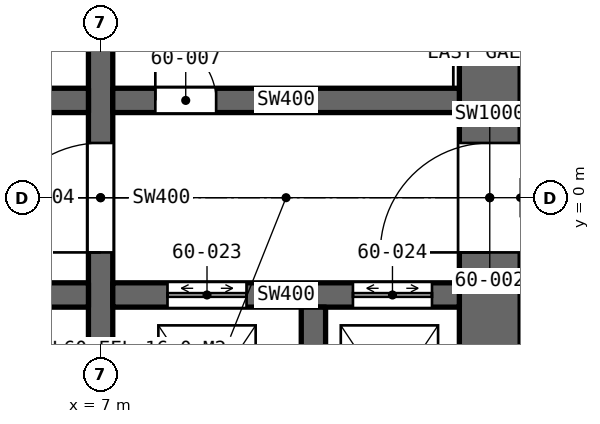
"""IFC4 building model, lengths in metres.
Left out: names, types, materials, properties, quantities, classifications, styles, units other than length and angle.
Written with IfcOpenShell. Run it as: python <this file> out.ifc"""

import sys

from ifc_helpers import new_model, si_unit, direction, frame, frame_2d, origin, place, context, subcontext, project, spatial, rectangle, extrude, element, fill, save


model = new_model("IFC4")
c1 = context("Model", 3, precision=1e-05, world=origin(), true_north=direction((0.0, 1.0)))
c2 = subcontext(c1, "Body", "Model", "MODEL_VIEW")
j1 = project(units=[si_unit("LENGTHUNIT", "METRE"), si_unit("PLANEANGLEUNIT", "RADIAN")], contexts=[c1])
p1 = place(None, origin())
s1 = spatial("IfcSite", under=j1, at=p1, CompositionType="ELEMENT")
p2 = place(p1, origin())
s2 = spatial("IfcBuilding", under=s1, at=p2, CompositionType="ELEMENT")
p3 = place(p2, frame((0.0, 0.0, 271.2)))
s3 = spatial("IfcBuildingStorey", under=s2, at=p3, CompositionType="ELEMENT", Elevation=271.2)
p4 = place(p3, frame((13.4, -8.9, 0.0), z_axis=(0.0, 0.0, 1.0), x_axis=(0.0, 1.0, 0.0)))
e1 = element("IfcWall", 1, at=p4, inside=s3, PredefinedType="SHEAR", context=c2, shape_type="SweptSolid", body=[
    extrude(rectangle(XDim=17.8, YDim=1.0, at=frame_2d((8.9, 0.0))), origin(), (0.0, 0.0, 1.0), 4.2),
])
p5 = place(p4, frame((8.0, 0.0, 0.0)))
e2 = element("IfcOpeningElement", 2, at=p5, cuts=e1, PredefinedType="OPENING", context=c2, shape_type="SweptSolid", body=[
    extrude(rectangle(XDim=1.8, YDim=2.4, at=frame_2d((0.9, 1.2))), frame((0.0, 0.51, 0.0), z_axis=(0.0, -1.0, 0.0), x_axis=(1.0, 0.0, 0.0)), (0.0, 0.0, 1.0), 1.02),
])
p6 = place(p3, frame((7.0, -8.9, 0.0), z_axis=(0.0, 0.0, 1.0), x_axis=(0.0, 1.0, 0.0)))
e3 = element("IfcWall", 3, at=p6, inside=s3, PredefinedType="SHEAR", context=c2, shape_type="SweptSolid", body=[
    extrude(rectangle(XDim=17.8, YDim=0.4, at=frame_2d((8.9, 0.0))), origin(), (0.0, 0.0, 1.0), 4.2),
])
p7 = place(p6, frame((8.0, 0.0, 0.0)))
e4 = element("IfcOpeningElement", 4, at=p7, cuts=e3, PredefinedType="OPENING", context=c2, shape_type="SweptSolid", body=[
    extrude(rectangle(XDim=1.8, YDim=2.4, at=frame_2d((0.9, 1.2))), frame((0.0, 0.21, 0.0), z_axis=(0.0, -1.0, 0.0), x_axis=(1.0, 0.0, 0.0)), (0.0, 0.0, 1.0), 0.42),
])
p8 = place(p3, frame((-6.8, 1.6, 0.0), z_axis=(0.0, 0.0, 1.0), x_axis=(1.0, 0.0, 0.0)))
e5 = element("IfcWall", 5, at=p8, inside=s3, PredefinedType="SHEAR", context=c2, shape_type="SweptSolid", body=[
    extrude(rectangle(XDim=13.6, YDim=0.4, at=frame_2d((6.8, 0.0))), origin(), (0.0, 0.0, 1.0), 4.2),
])
p9 = place(p8, frame((1.365, 0.0, 0.0)))
e6 = element("IfcOpeningElement", 6, at=p9, cuts=e5, PredefinedType="OPENING", context=c2, shape_type="SweptSolid", body=[
    extrude(rectangle(XDim=1.0, YDim=2.4, at=frame_2d((0.5, 1.2))), frame((0.0, 0.21, 0.0), z_axis=(0.0, -1.0, 0.0), x_axis=(1.0, 0.0, 0.0)), (0.0, 0.0, 1.0), 0.42),
])
p10 = place(p8, frame((5.1, 0.0, 0.0)))
e7 = element("IfcOpeningElement", 7, at=p10, cuts=e5, PredefinedType="OPENING", context=c2, shape_type="SweptSolid", body=[
    extrude(rectangle(XDim=1.0, YDim=2.4, at=frame_2d((0.5, 1.2))), frame((0.0, 0.21, 0.0), z_axis=(0.0, -1.0, 0.0), x_axis=(1.0, 0.0, 0.0)), (0.0, 0.0, 1.0), 0.42),
])
p11 = place(p8, frame((8.635, 0.0, 0.0)))
e8 = element("IfcOpeningElement", 8, at=p11, cuts=e5, PredefinedType="OPENING", context=c2, shape_type="SweptSolid", body=[
    extrude(rectangle(XDim=1.0, YDim=2.4, at=frame_2d((0.5, 1.2))), frame((0.0, 0.21, 0.0), z_axis=(0.0, -1.0, 0.0), x_axis=(1.0, 0.0, 0.0)), (0.0, 0.0, 1.0), 0.42),
])
p12 = place(p8, frame((11.95, 0.0, 0.0)))
e9 = element("IfcOpeningElement", 9, at=p12, cuts=e5, PredefinedType="OPENING", context=c2, shape_type="SweptSolid", body=[
    extrude(rectangle(XDim=0.9, YDim=2.4, at=frame_2d((0.45, 1.2))), frame((0.0, 0.21, 0.0), z_axis=(0.0, -1.0, 0.0), x_axis=(1.0, 0.0, 0.0)), (0.0, 0.0, 1.0), 0.42),
])
p13 = place(p3, frame((-6.8, -1.6, 0.0), z_axis=(0.0, 0.0, 1.0), x_axis=(1.0, 0.0, 0.0)))
e10 = element("IfcWall", 10, at=p13, inside=s3, PredefinedType="SHEAR", context=c2, shape_type="SweptSolid", body=[
    extrude(rectangle(XDim=13.6, YDim=0.4, at=frame_2d((6.8, 0.0))), origin(), (0.0, 0.0, 1.0), 4.2),
])
p14 = place(p13, frame((11.9, 0.0, 0.0)))
e11 = element("IfcOpeningElement", 11, at=p14, cuts=e10, PredefinedType="OPENING", context=c2, shape_type="SweptSolid", body=[
    extrude(rectangle(XDim=1.0, YDim=2.4, at=frame_2d((0.5, 1.2))), frame((0.0, 0.21, 0.0), z_axis=(0.0, -1.0, 0.0), x_axis=(1.0, 0.0, 0.0)), (0.0, 0.0, 1.0), 0.42),
])
p15 = place(p13, frame((4.5, 0.0, 0.0)))
e12 = element("IfcOpeningElement", 12, at=p15, cuts=e10, PredefinedType="OPENING", context=c2, shape_type="SweptSolid", body=[
    extrude(rectangle(XDim=1.8, YDim=2.4, at=frame_2d((0.9, 1.2))), frame((0.0, 0.21, 0.0), z_axis=(0.0, -1.0, 0.0), x_axis=(1.0, 0.0, 0.0)), (0.0, 0.0, 1.0), 0.42),
])
p16 = place(p3, frame((7.2, 1.6, 0.0), z_axis=(0.0, 0.0, 1.0), x_axis=(1.0, 0.0, 0.0)))
e13 = element("IfcWall", 13, at=p16, inside=s3, PredefinedType="SHEAR", context=c2, shape_type="SweptSolid", body=[
    extrude(rectangle(XDim=5.7, YDim=0.4, at=frame_2d((2.85, 0.0))), origin(), (0.0, 0.0, 1.0), 4.2),
])
p17 = place(p16, frame((0.7, 0.0, 0.0)))
e14 = element("IfcOpeningElement", 14, at=p17, cuts=e13, PredefinedType="OPENING", context=c2, shape_type="SweptSolid", body=[
    extrude(rectangle(XDim=1.0, YDim=2.4, at=frame_2d((0.5, 1.2))), frame((0.0, 0.21, 0.0), z_axis=(0.0, -1.0, 0.0), x_axis=(1.0, 0.0, 0.0)), (0.0, 0.0, 1.0), 0.42),
])
p18 = place(p3, frame((7.2, -1.6, 0.0), z_axis=(0.0, 0.0, 1.0), x_axis=(1.0, 0.0, 0.0)))
e15 = element("IfcWall", 15, at=p18, inside=s3, PredefinedType="SHEAR", context=c2, shape_type="SweptSolid", body=[
    extrude(rectangle(XDim=5.7, YDim=0.4, at=frame_2d((2.85, 0.0))), origin(), (0.0, 0.0, 1.0), 4.2),
])
p19 = place(p18, frame((0.9, 0.0, 0.0)))
e16 = element("IfcOpeningElement", 16, at=p19, cuts=e15, PredefinedType="OPENING", context=c2, shape_type="SweptSolid", body=[
    extrude(rectangle(XDim=1.3, YDim=2.4, at=frame_2d((0.65, 1.2))), frame((0.0, 0.21, 0.0), z_axis=(0.0, -1.0, 0.0), x_axis=(1.0, 0.0, 0.0)), (0.0, 0.0, 1.0), 0.42),
])
p20 = place(p18, frame((3.95, 0.0, 0.0)))
e17 = element("IfcOpeningElement", 17, at=p20, cuts=e15, PredefinedType="OPENING", context=c2, shape_type="SweptSolid", body=[
    extrude(rectangle(XDim=1.3, YDim=2.4, at=frame_2d((0.65, 1.2))), frame((0.0, 0.21, 0.0), z_axis=(0.0, -1.0, 0.0), x_axis=(1.0, 0.0, 0.0)), (0.0, 0.0, 1.0), 0.42),
])
p21 = place(p3, frame((10.5, -4.8, 0.0), z_axis=(0.0, 0.0, 1.0), x_axis=(0.0, 1.0, 0.0)))
e18 = element("IfcWall", 18, at=p21, inside=s3, PredefinedType="SHEAR", context=c2, shape_type="SweptSolid", body=[
    extrude(rectangle(XDim=3.0, YDim=0.4, at=frame_2d((1.5, 0.0))), origin(), (0.0, 0.0, 1.0), 4.2),
])
p22 = place(p5, origin())
e19 = element("IfcDoor", 19, at=p22, inside=s3, OperationType="DOUBLE_DOOR_SINGLE_SWING", PredefinedType="DOOR", context=c2, shape_type="SweptSolid", body=[
    extrude(rectangle(XDim=1.8, YDim=2.4, at=frame_2d((0.9, 1.2))), frame((0.0, 0.025, 0.0), z_axis=(0.0, -1.0, 0.0), x_axis=(1.0, 0.0, 0.0)), (0.0, 0.0, 1.0), 0.05),
])
fill(e2, e19)
p23 = place(p7, origin())
e20 = element("IfcDoor", 20, at=p23, inside=s3, OperationType="DOUBLE_DOOR_SINGLE_SWING", PredefinedType="DOOR", context=c2, shape_type="SweptSolid", body=[
    extrude(rectangle(XDim=1.8, YDim=2.4, at=frame_2d((0.9, 1.2))), frame((0.0, 0.025, 0.0), z_axis=(0.0, -1.0, 0.0), x_axis=(1.0, 0.0, 0.0)), (0.0, 0.0, 1.0), 0.05),
])
fill(e4, e20)
p24 = place(p17, origin())
e21 = element("IfcDoor", 21, at=p24, inside=s3, OperationType="SINGLE_SWING_LEFT", PredefinedType="DOOR", context=c2, shape_type="SweptSolid", body=[
    extrude(rectangle(XDim=1.0, YDim=2.4, at=frame_2d((0.5, 1.2))), frame((0.0, 0.025, 0.0), z_axis=(0.0, -1.0, 0.0), x_axis=(1.0, 0.0, 0.0)), (0.0, 0.0, 1.0), 0.05),
])
fill(e14, e21)
p25 = place(p19, origin())
e22 = element("IfcDoor", 22, at=p25, inside=s3, OperationType="DOUBLE_DOOR_SLIDING", PredefinedType="DOOR", context=c2, shape_type="SweptSolid", body=[
    extrude(rectangle(XDim=1.3, YDim=2.4, at=frame_2d((0.65, 1.2))), frame((0.0, 0.025, 0.0), z_axis=(0.0, -1.0, 0.0), x_axis=(1.0, 0.0, 0.0)), (0.0, 0.0, 1.0), 0.05),
])
fill(e16, e22)
p26 = place(p20, origin())
e23 = element("IfcDoor", 23, at=p26, inside=s3, OperationType="DOUBLE_DOOR_SLIDING", PredefinedType="DOOR", context=c2, shape_type="SweptSolid", body=[
    extrude(rectangle(XDim=1.3, YDim=2.4, at=frame_2d((0.65, 1.2))), frame((0.0, 0.025, 0.0), z_axis=(0.0, -1.0, 0.0), x_axis=(1.0, 0.0, 0.0)), (0.0, 0.0, 1.0), 0.05),
])
fill(e17, e23)
save(model, sys.argv[1])
